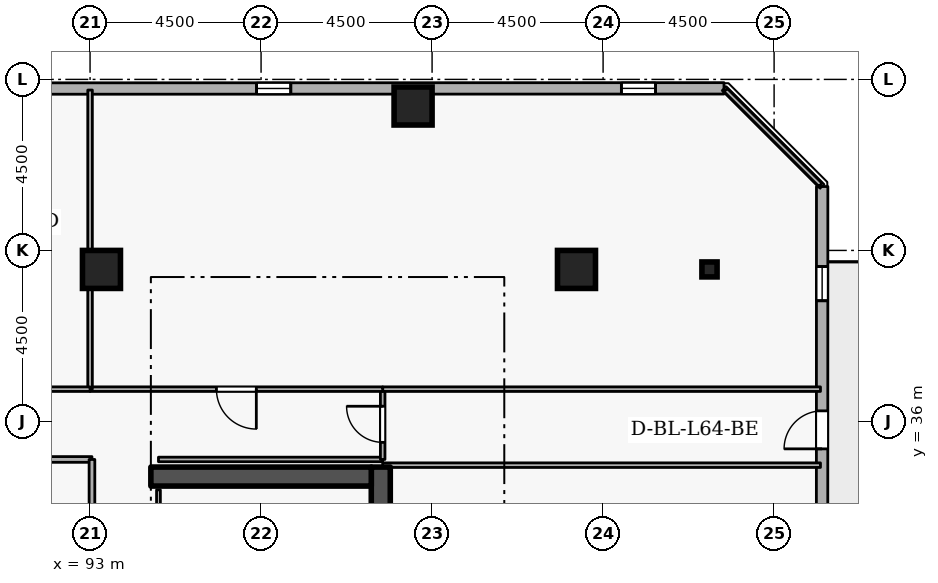
"""IFC4 building model, lengths in metres.
Left out: names, types, materials, properties, quantities, classifications, styles, units other than length and angle.
Written with IfcOpenShell. Run it as: python <this file> out.ifc"""

import sys

from ifc_helpers import new_model, si_unit, direction, frame, frame_2d, origin, origin_2d, place, context, subcontext, project, spatial, rectangle, i_section, extrude, element, fill, save


model = new_model("IFC4")
c1 = context("Model", 3, precision=1e-05, world=origin(), true_north=direction((0.0, 1.0)))
c2 = subcontext(c1, "Body", "Model", "MODEL_VIEW")
j1 = project(units=[si_unit("LENGTHUNIT", "METRE"), si_unit("PLANEANGLEUNIT", "RADIAN")], contexts=[c1])
p1 = place(None, origin())
s1 = spatial("IfcSite", under=j1, at=p1, CompositionType="ELEMENT")
p2 = place(p1, origin())
s2 = spatial("IfcBuilding", under=s1, at=p2, CompositionType="ELEMENT")
p3 = place(p2, frame((0.0, 0.0, 240.3)))
s3 = spatial("IfcBuildingStorey", under=s2, at=p3, CompositionType="ELEMENT", Elevation=240.3)
p4 = place(p3, frame((100.65, 19.2, 0.0), z_axis=(0.0, 0.0, 1.0), x_axis=(0.0, 1.0, 0.0)))
e1 = element("IfcWall", 1, at=p4, inside=s3, PredefinedType="SHEAR", context=c2, shape_type="SweptSolid", body=[
    extrude(rectangle(XDim=15.6, YDim=0.5, at=frame_2d((7.8, 0.0))), origin(), (0.0, 0.0, 1.0), 3.6),
])
p5 = place(p3, frame((94.6, 34.55, 0.0), z_axis=(0.0, 0.0, 1.0), x_axis=(1.0, 0.0, 0.0)))
e2 = element("IfcWall", 2, at=p5, inside=s3, PredefinedType="SHEAR", context=c2, shape_type="SweptSolid", body=[
    extrude(rectangle(XDim=5.8, YDim=0.5, at=frame_2d((2.9, 0.0))), origin(), (0.0, 0.0, 1.0), 3.6),
])
for number, where, z_axis, x_axis in (
    (3, (105.8, 40.0, 0.0), (0.0, 0.0, 1.0), (1.0, 0.0, 0.0)),
    (4, (101.5, 44.3, 0.0), (0.0, 0.0, 1.0), (1.0, 0.0, 0.0)),
    (5, (93.3, 40.0, 0.0), (0.0, 0.0, 1.0), (1.0, 0.0, 0.0)),
):
    element("IfcColumn", number, at=place(p3, frame(where, z_axis=z_axis, x_axis=x_axis)), inside=s3, PredefinedType="COLUMN", context=c2, shape_type="SweptSolid", body=[
        extrude(rectangle(XDim=1.0, YDim=1.0, at=origin_2d()), origin(), (0.0, 0.0, 1.0), 3.6),
    ])
p6 = place(p3, frame((109.3, 40.0, 0.0), z_axis=(0.0, 0.0, 1.0), x_axis=(1.0, 0.0, 0.0)))
e6 = element("IfcColumn", 6, at=p6, inside=s3, PredefinedType="COLUMN", context=c2, shape_type="SweptSolid", body=[
    extrude(i_section(OverallWidth=0.399, OverallDepth=0.394, WebThickness=0.023, FlangeThickness=0.037, FilletRadius=0.015, at=origin_2d()), origin(), (0.0, 0.0, 1.0), 3.6),
])
p7 = place(p3, frame((112.256, 8.576, 0.0), z_axis=(0.0, 0.0, 1.0), x_axis=(0.000268805477, 0.999999963872, 0.0)))
e7 = element("IfcWall", 7, at=p7, inside=s3, PredefinedType="STANDARD", context=c2, shape_type="SweptSolid", body=[
    extrude(rectangle(XDim=33.605, YDim=0.3, at=frame_2d((16.802, 0.0))), origin(), (0.0, 0.0, 1.0), 2.7),
])
p8 = place(p7, frame((26.702, 0.0, 0.0)))
e8 = element("IfcOpeningElement", 8, at=p8, cuts=e7, PredefinedType="OPENING", context=c2, shape_type="SweptSolid", body=[
    extrude(rectangle(XDim=1.0, YDim=2.08, at=frame_2d((0.5, 1.04))), frame((0.0, 0.16, 0.0), z_axis=(0.0, -1.0, 0.0), x_axis=(1.0, 0.0, 0.0)), (0.0, 0.0, 1.0), 0.32),
])
p9 = place(p7, frame((1.8, 0.0, 0.72)))
e9 = element("IfcOpeningElement", 9, at=p9, cuts=e7, PredefinedType="OPENING", context=c2, shape_type="SweptSolid", body=[
    extrude(rectangle(XDim=0.9, YDim=1.75, at=frame_2d((0.45, 0.875))), frame((0.0, 0.16, 0.0), z_axis=(0.0, -1.0, 0.0), x_axis=(1.0, 0.0, 0.0)), (0.0, 0.0, 1.0), 0.32),
])
p10 = place(p7, frame((6.6, 0.0, 0.72)))
e10 = element("IfcOpeningElement", 10, at=p10, cuts=e7, PredefinedType="OPENING", context=c2, shape_type="SweptSolid", body=[
    extrude(rectangle(XDim=0.9, YDim=1.75, at=frame_2d((0.45, 0.875))), frame((0.0, 0.16, 0.0), z_axis=(0.0, -1.0, 0.0), x_axis=(1.0, 0.0, 0.0)), (0.0, 0.0, 1.0), 0.32),
])
p11 = place(p7, frame((11.4, 0.0, 0.72)))
e11 = element("IfcOpeningElement", 11, at=p11, cuts=e7, PredefinedType="OPENING", context=c2, shape_type="SweptSolid", body=[
    extrude(rectangle(XDim=0.9, YDim=1.75, at=frame_2d((0.45, 0.875))), frame((0.0, 0.16, 0.0), z_axis=(0.0, -1.0, 0.0), x_axis=(1.0, 0.0, 0.0)), (0.0, 0.0, 1.0), 0.32),
])
p12 = place(p7, frame((16.2, 0.0, 0.72)))
e12 = element("IfcOpeningElement", 12, at=p12, cuts=e7, PredefinedType="OPENING", context=c2, shape_type="SweptSolid", body=[
    extrude(rectangle(XDim=0.9, YDim=1.75, at=frame_2d((0.45, 0.875))), frame((0.0, 0.16, 0.0), z_axis=(0.0, -1.0, 0.0), x_axis=(1.0, 0.0, 0.0)), (0.0, 0.0, 1.0), 0.32),
])
p13 = place(p7, frame((21.0, 0.0, 0.72)))
e13 = element("IfcOpeningElement", 13, at=p13, cuts=e7, PredefinedType="OPENING", context=c2, shape_type="SweptSolid", body=[
    extrude(rectangle(XDim=0.9, YDim=1.75, at=frame_2d((0.45, 0.875))), frame((0.0, 0.16, 0.0), z_axis=(0.0, -1.0, 0.0), x_axis=(1.0, 0.0, 0.0)), (0.0, 0.0, 1.0), 0.32),
])
p14 = place(p7, frame((30.6, 0.0, 0.72)))
e14 = element("IfcOpeningElement", 14, at=p14, cuts=e7, PredefinedType="OPENING", context=c2, shape_type="SweptSolid", body=[
    extrude(rectangle(XDim=0.9, YDim=1.75, at=frame_2d((0.45, 0.875))), frame((0.0, 0.16, 0.0), z_axis=(0.0, -1.0, 0.0), x_axis=(1.0, 0.0, 0.0)), (0.0, 0.0, 1.0), 0.32),
])
p15 = place(p3, frame((109.681, 44.765, 0.0), z_axis=(0.0, 0.0, 1.0), x_axis=(-0.999999963872, -0.000268805477, 0.0)))
e15 = element("IfcWall", 15, at=p15, inside=s3, PredefinedType="STANDARD", context=c2, shape_type="SweptSolid", body=[
    extrude(rectangle(XDim=33.605, YDim=0.3, at=frame_2d((16.802, 0.0))), origin(), (0.0, 0.0, 1.0), 2.7),
])
p16 = place(p15, frame((1.8, 0.0, 0.72)))
e16 = element("IfcOpeningElement", 16, at=p16, cuts=e15, PredefinedType="OPENING", context=c2, shape_type="SweptSolid", body=[
    extrude(rectangle(XDim=0.9, YDim=1.75, at=frame_2d((0.45, 0.875))), frame((0.0, 0.16, 0.0), z_axis=(0.0, -1.0, 0.0), x_axis=(1.0, 0.0, 0.0)), (0.0, 0.0, 1.0), 0.32),
])
p17 = place(p15, frame((11.4, 0.0, 0.72)))
e17 = element("IfcOpeningElement", 17, at=p17, cuts=e15, PredefinedType="OPENING", context=c2, shape_type="SweptSolid", body=[
    extrude(rectangle(XDim=0.9, YDim=1.75, at=frame_2d((0.45, 0.875))), frame((0.0, 0.16, 0.0), z_axis=(0.0, -1.0, 0.0), x_axis=(1.0, 0.0, 0.0)), (0.0, 0.0, 1.0), 0.32),
])
p18 = place(p15, frame((25.8, 0.0, 0.72)))
e18 = element("IfcOpeningElement", 18, at=p18, cuts=e15, PredefinedType="OPENING", context=c2, shape_type="SweptSolid", body=[
    extrude(rectangle(XDim=0.9, YDim=1.75, at=frame_2d((0.45, 0.875))), frame((0.0, 0.16, 0.0), z_axis=(0.0, -1.0, 0.0), x_axis=(1.0, 0.0, 0.0)), (0.0, 0.0, 1.0), 0.32),
])
p19 = place(p15, frame((30.6, 0.0, 0.72)))
e19 = element("IfcOpeningElement", 19, at=p19, cuts=e15, PredefinedType="OPENING", context=c2, shape_type="SweptSolid", body=[
    extrude(rectangle(XDim=0.9, YDim=1.75, at=frame_2d((0.45, 0.875))), frame((0.0, 0.16, 0.0), z_axis=(0.0, -1.0, 0.0), x_axis=(1.0, 0.0, 0.0)), (0.0, 0.0, 1.0), 0.32),
])
p20 = place(p3, frame((94.8, 32.05, 0.0), z_axis=(0.0, 0.0, 1.0), x_axis=(0.0, 1.0, 0.0)))
e20 = element("IfcWall", 20, at=p20, inside=s3, PredefinedType="PARTITIONING", context=c2, shape_type="SweptSolid", body=[
    extrude(rectangle(XDim=2.15, YDim=0.1, at=frame_2d((1.075, 0.0))), origin(), (0.0, 0.0, 1.0), 3.34),
])
p21 = place(p20, frame((0.6, 0.0, 0.0)))
e21 = element("IfcOpeningElement", 21, at=p21, cuts=e20, PredefinedType="OPENING", context=c2, shape_type="SweptSolid", body=[
    extrude(rectangle(XDim=0.95, YDim=2.1, at=frame_2d((0.475, 1.05))), frame((0.0, 0.06, 0.0), z_axis=(0.0, -1.0, 0.0), x_axis=(1.0, 0.0, 0.0)), (0.0, 0.0, 1.0), 0.12),
])
p22 = place(p3, frame((94.8, 35.0, 0.0), z_axis=(0.0, 0.0, 1.0), x_axis=(1.0, 0.0, 0.0)))
e22 = element("IfcWall", 22, at=p22, inside=s3, PredefinedType="PARTITIONING", context=c2, shape_type="SweptSolid", body=[
    extrude(rectangle(XDim=5.9, YDim=0.12, at=frame_2d((2.95, 0.0))), origin(), (0.0, 0.0, 1.0), 3.34),
])
p23 = place(p3, frame((100.7, 35.0, 0.0), z_axis=(0.0, 0.0, 1.0), x_axis=(0.0, 1.0, 0.0)))
e23 = element("IfcWall", 23, at=p23, inside=s3, PredefinedType="PARTITIONING", context=c2, shape_type="SweptSolid", body=[
    extrude(rectangle(XDim=1.85, YDim=0.12, at=frame_2d((0.925, 0.0))), origin(), (0.0, 0.0, 1.0), 3.34),
])
p24 = place(p23, frame((0.45, 0.0, 0.0)))
e24 = element("IfcOpeningElement", 24, at=p24, cuts=e23, PredefinedType="OPENING", context=c2, shape_type="SweptSolid", body=[
    extrude(rectangle(XDim=0.95, YDim=2.1, at=frame_2d((0.475, 1.05))), frame((0.0, 0.07, 0.0), z_axis=(0.0, -1.0, 0.0), x_axis=(1.0, 0.0, 0.0)), (0.0, 0.0, 1.0), 0.14),
])
for number, where, z_axis, x_axis in (
    (25, (100.7, 36.85, 0.0), (0.0, 0.0, 1.0), (1.0, 0.0, 0.0)),
    (26, (112.22, 34.85, 0.0), (0.0, 0.0, 1.0), (-1.0, 0.0, 0.0)),
):
    element("IfcWall", number, at=place(p3, frame(where, z_axis=z_axis, x_axis=x_axis)), inside=s3, PredefinedType="PARTITIONING", context=c2, shape_type="SweptSolid", body=[
        extrude(rectangle(XDim=11.52, YDim=0.12, at=frame_2d((5.76, 0.0))), origin(), (0.0, 0.0, 1.0), 3.34),
    ])
p25 = place(p3, frame((100.7, 36.85, 0.0), z_axis=(0.0, 0.0, 1.0), x_axis=(-1.0, 0.0, 0.0)))
e27 = element("IfcWall", 27, at=p25, inside=s3, PredefinedType="PARTITIONING", context=c2, shape_type="SweptSolid", body=[
    extrude(rectangle(XDim=7.7, YDim=0.12, at=frame_2d((3.85, 0.0))), origin(), (0.0, 0.0, 1.0), 3.34),
])
p26 = place(p25, frame((3.325, 0.0, 0.0)))
e28 = element("IfcOpeningElement", 28, at=p26, cuts=e27, PredefinedType="OPENING", context=c2, shape_type="SweptSolid", body=[
    extrude(rectangle(XDim=1.05, YDim=2.1, at=frame_2d((0.525, 1.05))), frame((0.0, 0.07, 0.0), z_axis=(0.0, -1.0, 0.0), x_axis=(1.0, 0.0, 0.0)), (0.0, 0.0, 1.0), 0.14),
])
p27 = place(p3, frame((93.0, 36.85, 0.0), z_axis=(0.0, 0.0, 1.0), x_axis=(0.0, 1.0, 0.0)))
e29 = element("IfcWall", 29, at=p27, inside=s3, PredefinedType="PARTITIONING", context=c2, shape_type="SweptSolid", body=[
    extrude(rectangle(XDim=7.87, YDim=0.12, at=frame_2d((3.935, 0.0))), origin(), (0.0, 0.0, 1.0), 3.34),
])
p28 = place(p3, frame((109.725, 44.72, 0.0), z_axis=(0.0, 0.0, 1.0), x_axis=(0.707106781187, -0.707106781187, 0.0)))
e30 = element("IfcWall", 30, at=p28, inside=s3, PredefinedType="PARTITIONING", context=c2, shape_type="SweptSolid", body=[
    extrude(rectangle(XDim=3.528, YDim=0.12, at=frame_2d((1.764, 0.0))), origin(), (0.0, 0.0, 1.0), 3.34),
])
p29 = place(p3, frame((93.0, 36.85, 0.0), z_axis=(0.0, 0.0, 1.0), x_axis=(-1.0, 0.0, 0.0)))
e31 = element("IfcWall", 31, at=p29, inside=s3, PredefinedType="PARTITIONING", context=c2, shape_type="SweptSolid", body=[
    extrude(rectangle(XDim=6.3, YDim=0.12, at=frame_2d((3.15, 0.0))), origin(), (0.0, 0.0, 1.0), 3.34),
])
p30 = place(p29, frame((2.675, 0.0, 0.0)))
e32 = element("IfcOpeningElement", 32, at=p30, cuts=e31, PredefinedType="OPENING", context=c2, shape_type="SweptSolid", body=[
    extrude(rectangle(XDim=0.95, YDim=2.1, at=frame_2d((0.475, 1.05))), frame((0.0, 0.07, 0.0), z_axis=(0.0, -1.0, 0.0), x_axis=(1.0, 0.0, 0.0)), (0.0, 0.0, 1.0), 0.14),
])
p31 = place(p3, frame((88.5, 35.0, 0.0), z_axis=(0.0, 0.0, 1.0), x_axis=(1.0, 0.0, 0.0)))
e33 = element("IfcWall", 33, at=p31, inside=s3, PredefinedType="PARTITIONING", context=c2, shape_type="SweptSolid", body=[
    extrude(rectangle(XDim=4.55, YDim=0.15, at=frame_2d((2.275, 0.0))), origin(), (0.0, 0.0, 1.0), 3.34),
])
p32 = place(p31, frame((1.625, 0.0, 0.0)))
e34 = element("IfcOpeningElement", 34, at=p32, cuts=e33, PredefinedType="OPENING", context=c2, shape_type="SweptSolid", body=[
    extrude(rectangle(XDim=1.3, YDim=2.12, at=frame_2d((0.65, 1.06))), frame((0.0, 0.085, 0.0), z_axis=(0.0, -1.0, 0.0), x_axis=(1.0, 0.0, 0.0)), (0.0, 0.0, 1.0), 0.17),
])
p33 = place(p3, frame((93.05, 35.0, 0.0), z_axis=(0.0, 0.0, 1.0), x_axis=(0.0, -1.0, 0.0)))
e35 = element("IfcWall", 35, at=p33, inside=s3, PredefinedType="PARTITIONING", context=c2, shape_type="SweptSolid", body=[
    extrude(rectangle(XDim=2.8, YDim=0.15, at=frame_2d((1.4, 0.0))), origin(), (0.0, 0.0, 1.0), 3.34),
])
p34 = place(p8, origin())
e36 = element("IfcDoor", 36, at=p34, inside=s3, OperationType="SINGLE_SWING_LEFT", PredefinedType="DOOR", context=c2, shape_type="SweptSolid", body=[
    extrude(rectangle(XDim=1.0, YDim=2.08, at=frame_2d((0.5, 1.04))), frame((0.0, 0.025, 0.0), z_axis=(0.0, -1.0, 0.0), x_axis=(1.0, 0.0, 0.0)), (0.0, 0.0, 1.0), 0.05),
])
fill(e8, e36)
p35 = place(p14, origin())
e37 = element("IfcWindow", 37, at=p35, inside=s3, PartitioningType="SINGLE_PANEL", PredefinedType="WINDOW", context=c2, shape_type="SweptSolid", body=[
    extrude(rectangle(XDim=0.9, YDim=1.75, at=frame_2d((0.45, 0.875))), frame((0.0, 0.03, 0.0), z_axis=(0.0, -1.0, 0.0), x_axis=(1.0, 0.0, 0.0)), (0.0, 0.0, 1.0), 0.06),
])
fill(e14, e37)
p36 = place(p16, origin())
e38 = element("IfcWindow", 38, at=p36, inside=s3, PartitioningType="SINGLE_PANEL", PredefinedType="WINDOW", context=c2, shape_type="SweptSolid", body=[
    extrude(rectangle(XDim=0.9, YDim=1.75, at=frame_2d((0.45, 0.875))), frame((0.0, 0.03, 0.0), z_axis=(0.0, -1.0, 0.0), x_axis=(1.0, 0.0, 0.0)), (0.0, 0.0, 1.0), 0.06),
])
fill(e16, e38)
p37 = place(p17, origin())
e39 = element("IfcWindow", 39, at=p37, inside=s3, PartitioningType="SINGLE_PANEL", PredefinedType="WINDOW", context=c2, shape_type="SweptSolid", body=[
    extrude(rectangle(XDim=0.9, YDim=1.75, at=frame_2d((0.45, 0.875))), frame((0.0, 0.03, 0.0), z_axis=(0.0, -1.0, 0.0), x_axis=(1.0, 0.0, 0.0)), (0.0, 0.0, 1.0), 0.06),
])
fill(e17, e39)
p38 = place(p24, origin())
e40 = element("IfcDoor", 40, at=p38, inside=s3, OperationType="SINGLE_SWING_RIGHT", PredefinedType="DOOR", context=c2, shape_type="SweptSolid", body=[
    extrude(rectangle(XDim=0.95, YDim=2.1, at=frame_2d((0.475, 1.05))), frame((0.0, 0.025, 0.0), z_axis=(0.0, -1.0, 0.0), x_axis=(1.0, 0.0, 0.0)), (0.0, 0.0, 1.0), 0.05),
])
fill(e24, e40)
p39 = place(p26, origin())
e41 = element("IfcDoor", 41, at=p39, inside=s3, OperationType="SINGLE_SWING_LEFT", PredefinedType="DOOR", context=c2, shape_type="SweptSolid", body=[
    extrude(rectangle(XDim=1.05, YDim=2.1, at=frame_2d((0.525, 1.05))), frame((0.0, 0.025, 0.0), z_axis=(0.0, -1.0, 0.0), x_axis=(1.0, 0.0, 0.0)), (0.0, 0.0, 1.0), 0.05),
])
fill(e28, e41)
save(model, sys.argv[1])
